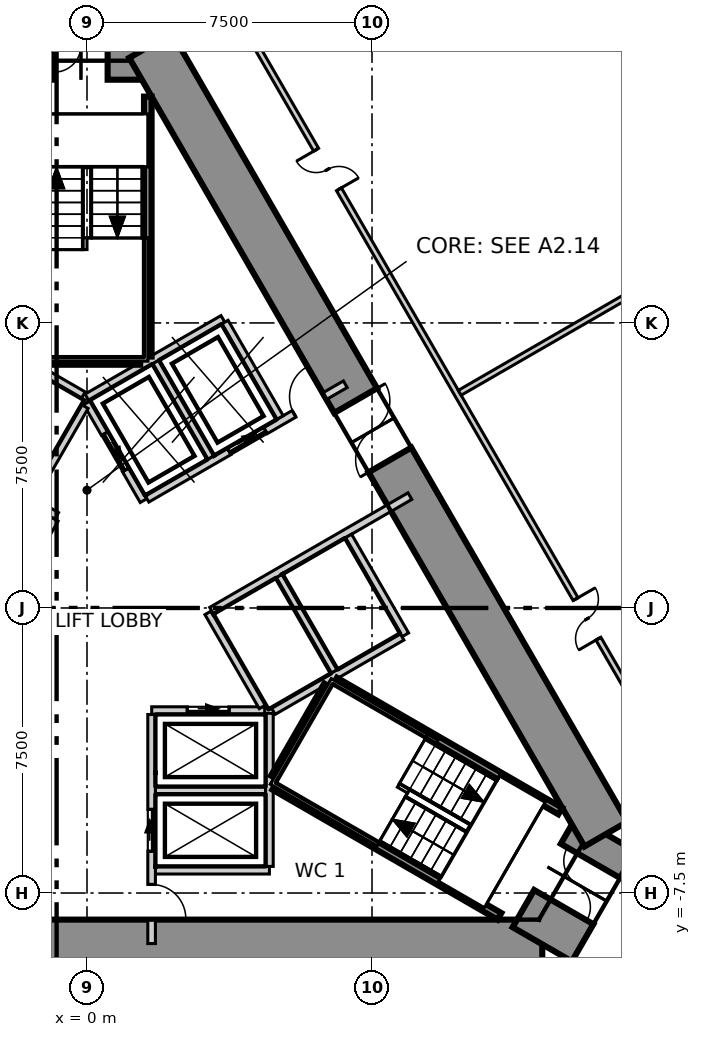
"""IFC4 building model, lengths in metres.
Left out: names, types, materials, properties, quantities, classifications, styles, units other than length and angle.
Written with IfcOpenShell. Run it as: python <this file> out.ifc"""

import sys

from ifc_helpers import new_model, si_unit, direction, frame, frame_2d, origin, place, context, subcontext, project, spatial, polyline, rectangle, outline, extrude, element, fill, save


model = new_model("IFC4")
c1 = context("Model", 3, precision=1e-05, world=origin(), true_north=direction((0.0, 1.0)))
c2 = subcontext(c1, "Body", "Model", "MODEL_VIEW")
j1 = project(units=[si_unit("LENGTHUNIT", "METRE"), si_unit("PLANEANGLEUNIT", "RADIAN")], contexts=[c1])
p1 = place(None, origin())
s1 = spatial("IfcSite", under=j1, at=p1, CompositionType="ELEMENT")
p2 = place(p1, origin())
s2 = spatial("IfcBuilding", under=s1, at=p2, CompositionType="ELEMENT")
p3 = place(p2, frame((0.0, 0.0, 99.8)))
s3 = spatial("IfcBuildingStorey", under=s2, at=p3, CompositionType="ELEMENT", Elevation=99.8)
p4 = place(p3, frame((1.674, 14.8, -0.6), z_axis=(0.0, 0.0, 1.0), x_axis=(-1.0, 0.0, 0.0)))
e1 = element("IfcWall", 1, at=p4, inside=s3, PredefinedType="SHEAR", context=c2, shape_type="SweptSolid", body=[
    extrude(outline(polyline([(-0.231, -0.9), (1.674, -0.9), (3.579, -0.9), (3.117, 0.9), (1.674, 0.9), (0.231, 0.9), (-0.231, -0.9)])), origin(), (0.0, 0.0, 1.0), 4.8),
])
p5 = place(p4, frame((1.133, 0.0, 0.6)))
e2 = element("IfcOpeningElement", 2, at=p5, cuts=e1, PredefinedType="OPENING", context=c2, shape_type="SweptSolid", body=[
    extrude(rectangle(XDim=1.4, YDim=2.1, at=frame_2d((0.7, 1.05))), frame((0.0, 0.91, 0.0), z_axis=(0.0, -1.0, 0.0), x_axis=(1.0, 0.0, 0.0)), (0.0, 0.0, 1.0), 1.82),
])
p6 = place(p3, frame((-11.98, -8.85, -0.6), z_axis=(0.0, 0.0, 1.0), x_axis=(1.0, 0.0, 0.0)))
e3 = element("IfcWall", 3, at=p6, inside=s3, PredefinedType="SHEAR", context=c2, shape_type="SweptSolid", body=[
    extrude(outline(polyline([(-0.664, -0.65), (1.281, -0.65), (3.226, -0.65), (5.172, -0.65), (7.117, -0.65), (9.062, -0.65), (11.007, -0.65), (12.953, -0.65), (14.898, -0.65), (16.843, -0.65), (18.788, -0.65), (20.734, -0.65), (22.679, -0.65), (24.624, -0.65), (23.296, 0.65), (21.41, 0.65), (19.524, 0.65), (17.638, 0.65), (15.752, 0.65), (13.866, 0.65), (11.98, 0.65), (10.094, 0.65), (8.208, 0.65), (6.322, 0.65), (4.436, 0.65), (2.55, 0.65), (0.664, 0.65), (-0.664, -0.65)])), origin(), (0.0, 0.0, 1.0), 4.8),
])
p7 = place(p3, frame((11.98, -8.85, -0.6), z_axis=(0.0, 0.0, 1.0), x_axis=(0.499926515799, 0.866067825751, 0.0)))
e4 = element("IfcWall", 4, at=p7, inside=s3, PredefinedType="SHEAR", context=c2, shape_type="SweptSolid", body=[
    extrude(outline(polyline([(-0.231, -0.9), (1.674, -0.9), (3.579, -0.9), (3.118, 0.9), (1.674, 0.9), (0.231, 0.9), (-0.231, -0.9)])), origin(), (0.0, 0.0, 1.0), 4.8),
])
p8 = place(p7, frame((1.133, 0.0, 0.6)))
e5 = element("IfcOpeningElement", 5, at=p8, cuts=e4, PredefinedType="OPENING", context=c2, shape_type="SweptSolid", body=[
    extrude(rectangle(XDim=1.4, YDim=2.1, at=frame_2d((0.7, 1.05))), frame((0.0, 0.91, 0.0), z_axis=(0.0, -1.0, 0.0), x_axis=(1.0, 0.0, 0.0)), (0.0, 0.0, 1.0), 1.82),
])
p9 = place(p3, frame((13.654, -5.95, -0.6), z_axis=(0.0, 0.0, 1.0), x_axis=(-0.499998822509, 0.866026083608, 0.0)))
e6 = element("IfcWall", 6, at=p9, inside=s3, PredefinedType="SHEAR", context=c2, shape_type="SweptSolid", body=[
    extrude(outline(polyline([(-0.664, -0.65), (1.281, -0.65), (3.226, -0.65), (5.172, -0.65), (7.117, -0.65), (9.062, -0.65), (11.007, -0.65), (12.953, -0.65), (14.898, -0.65), (16.843, -0.65), (18.788, -0.65), (20.734, -0.65), (22.679, -0.65), (24.624, -0.65), (23.296, 0.65), (21.41, 0.65), (19.524, 0.65), (17.638, 0.65), (15.752, 0.65), (13.866, 0.65), (11.98, 0.65), (10.094, 0.65), (8.208, 0.65), (6.322, 0.65), (4.436, 0.65), (2.55, 0.65), (0.664, 0.65), (-0.664, -0.65)])), origin(), (0.0, 0.0, 1.0), 4.8),
])
p10 = place(p9, frame((11.369, 0.0, 0.6)))
e7 = element("IfcOpeningElement", 7, at=p10, cuts=e6, PredefinedType="OPENING", context=c2, shape_type="SweptSolid", body=[
    extrude(rectangle(XDim=1.8, YDim=2.1, at=frame_2d((0.9, 1.05))), frame((0.0, 0.66, 0.0), z_axis=(0.0, -1.0, 0.0), x_axis=(1.0, 0.0, 0.0)), (0.0, 0.0, 1.0), 1.32),
])
p11 = place(p3, frame((32.683, -15.155, 0.0), z_axis=(0.0, 0.0, 1.0), x_axis=(-0.499995323711, 0.866028103624, 0.0)))
e8 = element("IfcWall", 8, at=p11, inside=s3, PredefinedType="ELEMENTEDWALL", context=c2, shape_type="SweptSolid", body=[
    extrude(rectangle(XDim=58.913, YDim=0.2, at=frame_2d((29.456, 0.0))), origin(), (0.0, 0.0, 1.0), 4.2),
])
p12 = place(p11, frame((2.023, 0.0, 0.6)))
e9 = element("IfcOpeningElement", 9, at=p12, cuts=e8, PredefinedType="OPENING", context=c2, shape_type="SweptSolid", body=[
    extrude(rectangle(XDim=5.6, YDim=3.0, at=frame_2d((2.8, 1.5))), frame((0.0, 0.11, 0.0), z_axis=(0.0, -1.0, 0.0), x_axis=(1.0, 0.0, 0.0)), (0.0, 0.0, 1.0), 0.22),
])
p13 = place(p11, frame((9.064, 0.0, 0.6)))
e10 = element("IfcOpeningElement", 10, at=p13, cuts=e8, PredefinedType="OPENING", context=c2, shape_type="SweptSolid", body=[
    extrude(rectangle(XDim=5.6, YDim=3.0, at=frame_2d((2.8, 1.5))), frame((0.0, 0.11, 0.0), z_axis=(0.0, -1.0, 0.0), x_axis=(1.0, 0.0, 0.0)), (0.0, 0.0, 1.0), 0.22),
])
p14 = place(p11, frame((16.105, 0.0, 0.6)))
e11 = element("IfcOpeningElement", 11, at=p14, cuts=e8, PredefinedType="OPENING", context=c2, shape_type="SweptSolid", body=[
    extrude(rectangle(XDim=5.6, YDim=3.0, at=frame_2d((2.8, 1.5))), frame((0.0, 0.11, 0.0), z_axis=(0.0, -1.0, 0.0), x_axis=(1.0, 0.0, 0.0)), (0.0, 0.0, 1.0), 0.22),
])
p15 = place(p11, frame((23.146, 0.0, 0.6)))
e12 = element("IfcOpeningElement", 12, at=p15, cuts=e8, PredefinedType="OPENING", context=c2, shape_type="SweptSolid", body=[
    extrude(rectangle(XDim=5.6, YDim=3.0, at=frame_2d((2.8, 1.5))), frame((0.0, 0.11, 0.0), z_axis=(0.0, -1.0, 0.0), x_axis=(1.0, 0.0, 0.0)), (0.0, 0.0, 1.0), 0.22),
])
p16 = place(p11, frame((30.187, 0.0, 0.6)))
e13 = element("IfcOpeningElement", 13, at=p16, cuts=e8, PredefinedType="OPENING", context=c2, shape_type="SweptSolid", body=[
    extrude(rectangle(XDim=5.6, YDim=3.0, at=frame_2d((2.8, 1.5))), frame((0.0, 0.11, 0.0), z_axis=(0.0, -1.0, 0.0), x_axis=(1.0, 0.0, 0.0)), (0.0, 0.0, 1.0), 0.22),
])
p17 = place(p11, frame((37.228, 0.0, 0.6)))
e14 = element("IfcOpeningElement", 14, at=p17, cuts=e8, PredefinedType="OPENING", context=c2, shape_type="SweptSolid", body=[
    extrude(rectangle(XDim=5.6, YDim=3.0, at=frame_2d((2.8, 1.5))), frame((0.0, 0.11, 0.0), z_axis=(0.0, -1.0, 0.0), x_axis=(1.0, 0.0, 0.0)), (0.0, 0.0, 1.0), 0.22),
])
p18 = place(p11, frame((44.268, 0.0, 0.6)))
e15 = element("IfcOpeningElement", 15, at=p18, cuts=e8, PredefinedType="OPENING", context=c2, shape_type="SweptSolid", body=[
    extrude(rectangle(XDim=5.6, YDim=3.0, at=frame_2d((2.8, 1.5))), frame((0.0, 0.11, 0.0), z_axis=(0.0, -1.0, 0.0), x_axis=(1.0, 0.0, 0.0)), (0.0, 0.0, 1.0), 0.22),
])
p19 = place(p11, frame((51.309, 0.0, 0.6)))
e16 = element("IfcOpeningElement", 16, at=p19, cuts=e8, PredefinedType="OPENING", context=c2, shape_type="SweptSolid", body=[
    extrude(rectangle(XDim=5.6, YDim=3.0, at=frame_2d((2.8, 1.5))), frame((0.0, 0.11, 0.0), z_axis=(0.0, -1.0, 0.0), x_axis=(1.0, 0.0, 0.0)), (0.0, 0.0, 1.0), 0.22),
])
p20 = place(p3, frame((2.959, 17.375, 0.0), z_axis=(0.0, 0.0, 1.0), x_axis=(0.500002192499, -0.866024137941, 0.0)))
e17 = element("IfcWall", 17, at=p20, inside=s3, PredefinedType="PARTITIONING", context=c2, shape_type="SweptSolid", body=[
    extrude(rectangle(XDim=27.222, YDim=0.15, at=frame_2d((13.611, 0.0))), origin(), (0.0, 0.0, 1.0), 4.2),
])
p21 = place(p20, frame((19.795, 0.0, 0.0)))
e18 = element("IfcOpeningElement", 18, at=p21, cuts=e17, PredefinedType="OPENING", context=c2, shape_type="SweptSolid", body=[
    extrude(rectangle(XDim=1.2, YDim=2.1, at=frame_2d((0.6, 1.05))), frame((0.0, 0.085, 0.0), z_axis=(0.0, -1.0, 0.0), x_axis=(1.0, 0.0, 0.0)), (0.0, 0.0, 1.0), 0.17),
])
p22 = place(p20, frame((6.141, 0.0, 0.0)))
e19 = element("IfcOpeningElement", 19, at=p22, cuts=e17, PredefinedType="OPENING", context=c2, shape_type="SweptSolid", body=[
    extrude(rectangle(XDim=1.2, YDim=2.1, at=frame_2d((0.6, 1.05))), frame((0.0, 0.085, 0.0), z_axis=(0.0, -1.0, 0.0), x_axis=(1.0, 0.0, 0.0)), (0.0, 0.0, 1.0), 0.17),
])
p23 = place(p3, frame((9.808, 5.662, 0.0), z_axis=(0.0, 0.0, 1.0), x_axis=(0.866014767649, 0.500018421874, 0.0)))
e20 = element("IfcWall", 20, at=p23, inside=s3, PredefinedType="PARTITIONING", context=c2, shape_type="SweptSolid", body=[
    extrude(rectangle(XDim=9.402, YDim=0.15, at=frame_2d((4.701, 0.0))), origin(), (0.0, 0.0, 1.0), 3.7),
])
p24 = place(p3, frame((1.8, -4.8, 0.0), z_axis=(0.0, 0.0, 1.0), x_axis=(1.0, 0.0, 0.0)))
e21 = element("IfcWall", 21, at=p24, inside=s3, PredefinedType="SOLIDWALL", context=c2, shape_type="SweptSolid", body=[
    extrude(rectangle(XDim=2.9, YDim=0.2, at=frame_2d((1.45, 0.0))), origin(), (0.0, 0.0, 1.0), 4.2),
])
p25 = place(p3, frame((1.8, -6.9, 0.0), z_axis=(0.0, 0.0, 1.0), x_axis=(1.0, 0.0, 0.0)))
e22 = element("IfcWall", 22, at=p25, inside=s3, PredefinedType="SOLIDWALL", context=c2, shape_type="SweptSolid", body=[
    extrude(rectangle(XDim=3.0, YDim=0.2, at=frame_2d((1.5, 0.0))), origin(), (0.0, 0.0, 1.0), 4.2),
])
p26 = place(p3, frame((1.703, -2.7, 0.0), z_axis=(0.0, 0.0, 1.0), x_axis=(1.0, 0.0, 0.0)))
e23 = element("IfcWall", 23, at=p26, inside=s3, PredefinedType="SOLIDWALL", context=c2, shape_type="SweptSolid", body=[
    extrude(rectangle(XDim=2.973, YDim=0.2, at=frame_2d((1.487, 0.0))), origin(), (0.0, 0.0, 1.0), 4.2),
])
p27 = place(p26, frame((0.936, 0.0, 0.0)))
e24 = element("IfcOpeningElement", 24, at=p27, cuts=e23, PredefinedType="OPENING", context=c2, shape_type="SweptSolid", body=[
    extrude(rectangle(XDim=1.1, YDim=2.1, at=frame_2d((0.55, 1.05))), frame((0.0, 0.11, 0.0), z_axis=(0.0, -1.0, 0.0), x_axis=(1.0, 0.0, 0.0)), (0.0, 0.0, 1.0), 0.22),
])
p28 = place(p3, frame((-0.002, 5.541, 0.0), z_axis=(0.0, 0.0, 1.0), x_axis=(0.86600155993, 0.500041296494, 0.0)))
e25 = element("IfcWall", 25, at=p28, inside=s3, PredefinedType="SOLIDWALL", context=c2, shape_type="SweptSolid", body=[
    extrude(rectangle(XDim=4.132, YDim=0.2, at=frame_2d((2.066, 0.0))), origin(), (0.0, 0.0, 1.0), 4.2),
])
p29 = place(p3, frame((0.0, 5.4, 0.0), z_axis=(0.0, 0.0, 1.0), x_axis=(0.500103862429, -0.865965430478, 0.0)))
e26 = element("IfcWall", 26, at=p29, inside=s3, PredefinedType="SOLIDWALL", context=c2, shape_type="SweptSolid", body=[
    extrude(rectangle(XDim=2.973, YDim=0.2, at=frame_2d((1.487, 0.0))), origin(), (0.0, 0.0, 1.0), 4.2),
])
p30 = place(p29, frame((0.937, 0.0, 0.0)))
e27 = element("IfcOpeningElement", 27, at=p30, cuts=e26, PredefinedType="OPENING", context=c2, shape_type="SweptSolid", body=[
    extrude(rectangle(XDim=1.1, YDim=2.1, at=frame_2d((0.55, 1.05))), frame((0.0, 0.11, 0.0), z_axis=(0.0, -1.0, 0.0), x_axis=(1.0, 0.0, 0.0)), (0.0, 0.0, 1.0), 0.22),
])
p31 = place(p3, frame((3.19, -0.125, 0.0), z_axis=(0.0, 0.0, 1.0), x_axis=(0.499988658015, -0.866031951983, 0.0)))
e28 = element("IfcWall", 28, at=p31, inside=s3, PredefinedType="SOLIDWALL", context=c2, shape_type="SweptSolid", body=[
    extrude(rectangle(XDim=2.858, YDim=0.2, at=frame_2d((1.429, 0.0))), origin(), (0.0, 0.0, 1.0), 4.2),
])
p32 = place(p3, frame((1.578, 2.874, 0.0), z_axis=(0.0, 0.0, 1.0), x_axis=(0.866053365281, 0.49995156614, 0.0)))
e29 = element("IfcWall", 29, at=p32, inside=s3, PredefinedType="SOLIDWALL", context=c2, shape_type="SweptSolid", body=[
    extrude(rectangle(XDim=6.026, YDim=0.2, at=frame_2d((3.013, 0.0))), origin(), (0.0, 0.0, 1.0), 4.2),
])
p33 = place(p32, frame((2.496, 0.0, 0.0)))
e30 = element("IfcOpeningElement", 30, at=p33, cuts=e29, PredefinedType="OPENING", context=c2, shape_type="SweptSolid", body=[
    extrude(rectangle(XDim=1.1, YDim=2.1, at=frame_2d((0.55, 1.05))), frame((0.0, 0.11, 0.0), z_axis=(0.0, -1.0, 0.0), x_axis=(1.0, 0.0, 0.0)), (0.0, 0.0, 1.0), 0.22),
])
p34 = place(p32, frame((4.471, 0.0, 0.0)))
e31 = element("IfcOpeningElement", 31, at=p34, cuts=e29, PredefinedType="OPENING", context=c2, shape_type="SweptSolid", body=[
    extrude(rectangle(XDim=0.9, YDim=2.1, at=frame_2d((0.45, 1.05))), frame((0.0, 0.11, 0.0), z_axis=(0.0, -1.0, 0.0), x_axis=(1.0, 0.0, 0.0)), (0.0, 0.0, 1.0), 0.22),
])
p35 = place(p3, frame((1.7, -8.83, 0.0), z_axis=(0.0, 0.0, 1.0), x_axis=(0.0, 1.0, 0.0)))
e32 = element("IfcWall", 32, at=p35, inside=s3, PredefinedType="SOLIDWALL", context=c2, shape_type="SweptSolid", body=[
    extrude(rectangle(XDim=6.027, YDim=0.2, at=frame_2d((3.014, 0.0))), origin(), (0.0, 0.0, 1.0), 4.2),
])
p36 = place(p35, frame((2.43, 0.0, 0.0)))
e33 = element("IfcOpeningElement", 33, at=p36, cuts=e32, PredefinedType="OPENING", context=c2, shape_type="SweptSolid", body=[
    extrude(rectangle(XDim=1.1, YDim=2.1, at=frame_2d((0.55, 1.05))), frame((0.0, 0.11, 0.0), z_axis=(0.0, -1.0, 0.0), x_axis=(1.0, 0.0, 0.0)), (0.0, 0.0, 1.0), 0.22),
])
p37 = place(p35, frame((0.655, 0.0, 0.0)))
e34 = element("IfcOpeningElement", 34, at=p37, cuts=e32, PredefinedType="OPENING", context=c2, shape_type="SweptSolid", body=[
    extrude(rectangle(XDim=0.9, YDim=2.1, at=frame_2d((0.45, 1.05))), frame((0.0, 0.11, 0.0), z_axis=(0.0, -1.0, 0.0), x_axis=(1.0, 0.0, 0.0)), (0.0, 0.0, 1.0), 0.22),
])
p38 = place(p3, frame((4.8, -6.8, 0.0), z_axis=(0.0, 0.0, 1.0), x_axis=(0.0, 1.0, 0.0)))
e35 = element("IfcWall", 35, at=p38, inside=s3, PredefinedType="SOLIDWALL", context=c2, shape_type="SweptSolid", body=[
    extrude(rectangle(XDim=4.029, YDim=0.2, at=frame_2d((2.015, 0.0))), origin(), (0.0, 0.0, 1.0), 4.2),
])
p39 = place(p3, frame((3.278, -0.071, 0.0), z_axis=(0.0, 0.0, 1.0), x_axis=(0.865955525127, 0.500121013857, 0.0)))
e36 = element("IfcWall", 36, at=p39, inside=s3, PredefinedType="SOLIDWALL", context=c2, shape_type="SweptSolid", body=[
    extrude(rectangle(XDim=6.027, YDim=0.2, at=frame_2d((3.013, 0.0))), origin(), (0.0, 0.0, 1.0), 4.2),
])
p40 = place(p3, frame((3.626, 7.52, 0.0), z_axis=(0.0, 0.0, 1.0), x_axis=(0.500060147554, -0.865990674793, 0.0)))
e37 = element("IfcWall", 37, at=p40, inside=s3, PredefinedType="SOLIDWALL", context=c2, shape_type="SweptSolid", body=[
    extrude(rectangle(XDim=2.9, YDim=0.2, at=frame_2d((1.45, 0.0))), origin(), (0.0, 0.0, 1.0), 4.2),
])
p41 = place(p3, frame((6.876, 1.891, 0.0), z_axis=(0.0, 0.0, 1.0), x_axis=(0.499990139034, -0.866031096941, 0.0)))
e38 = element("IfcWall", 38, at=p41, inside=s3, PredefinedType="SOLIDWALL", context=c2, shape_type="SweptSolid", body=[
    extrude(rectangle(XDim=3.0, YDim=0.2, at=frame_2d((1.5, 0.0))), origin(), (0.0, 0.0, 1.0), 4.2),
])
for number, where, z_axis, x_axis in (
    (39, (1.807, 6.47, 0.0), (0.0, 0.0, 1.0), (0.5, -0.866, 0.0)),
    (40, (5.057, 0.841, 0.0), (0.0, 0.0, 1.0), (0.5, -0.866, 0.0)),
):
    element("IfcWall", number, at=place(p3, frame(where, z_axis=z_axis, x_axis=x_axis)), inside=s3, PredefinedType="SOLIDWALL", context=c2, shape_type="SweptSolid", body=[
        extrude(rectangle(XDim=2.9, YDim=0.2, at=frame_2d((1.45, 0.0))), origin(), (0.0, 0.0, 1.0), 4.2),
    ])
p42 = place(p3, frame((4.9, -2.714, 0.0), z_axis=(0.0, 0.0, 1.0), x_axis=(0.865992350556, 0.500057245502, 0.0)))
e41 = element("IfcWall", 41, at=p42, inside=s3, PredefinedType="SOLIDWALL", context=c2, shape_type="SweptSolid", body=[
    extrude(rectangle(XDim=3.914, YDim=0.2, at=frame_2d((1.957, 0.0))), origin(), (0.0, 0.0, 1.0), 4.2),
])
p43 = place(p3, frame((-1.488, 2.822, 0.0), z_axis=(0.0, 0.0, 1.0), x_axis=(0.866236612152, -0.499633997809, 0.0)))
e42 = element("IfcWall", 42, at=p43, inside=s3, PredefinedType="SOLIDWALL", context=c2, shape_type="SweptSolid", body=[
    extrude(rectangle(XDim=0.796, YDim=0.2, at=frame_2d((0.398, 0.0))), origin(), (0.0, 0.0, 1.0), 4.2),
])
p44 = place(p3, frame((-2.444, -0.433, 0.0), z_axis=(0.0, 0.0, 1.0), x_axis=(0.500035624827, 0.866004834804, 0.0)))
e43 = element("IfcWall", 43, at=p44, inside=s3, PredefinedType="SOLIDWALL", context=c2, shape_type="SweptSolid", body=[
    extrude(rectangle(XDim=3.194, YDim=0.2, at=frame_2d((1.597, 0.0))), origin(), (0.0, 0.0, 1.0), 4.2),
])
p45 = place(p3, frame((-1.67, 6.507, 0.0), z_axis=(0.0, 0.0, 1.0), x_axis=(0.865941441609, -0.500145398563, 0.0)))
e44 = element("IfcWall", 44, at=p45, inside=s3, PredefinedType="SOLIDWALL", context=c2, shape_type="SweptSolid", body=[
    extrude(rectangle(XDim=1.815, YDim=0.2, at=frame_2d((0.908, 0.0))), origin(), (0.0, 0.0, 1.0), 4.2),
])
p46 = place(p3, frame((-1.438, 2.909, 0.0), z_axis=(0.0, 0.0, 1.0), x_axis=(0.499829630636, 0.866123744241, 0.0)))
e45 = element("IfcWall", 45, at=p46, inside=s3, PredefinedType="SOLIDWALL", context=c2, shape_type="SweptSolid", body=[
    extrude(rectangle(XDim=2.761, YDim=0.2, at=frame_2d((1.38, 0.0))), origin(), (0.0, 0.0, 1.0), 4.2),
])
p47 = place(p3, frame((1.6, 6.615, 0.0), z_axis=(0.0, 0.0, 1.0), x_axis=(0.0, 1.0, 0.0)))
e46 = element("IfcWall", 46, at=p47, inside=s3, PredefinedType="SOLIDWALL", context=c2, shape_type="SweptSolid", body=[
    extrude(rectangle(XDim=6.84, YDim=0.2, at=frame_2d((3.42, 0.0))), origin(), (0.0, 0.0, 1.0), 4.2),
])
p48 = place(p3, frame((-1.4, 6.5, 0.0), z_axis=(0.0, 0.0, 1.0), x_axis=(1.0, 0.0, 0.0)))
e47 = element("IfcWall", 47, at=p48, inside=s3, PredefinedType="SOLIDWALL", context=c2, shape_type="SweptSolid", body=[
    extrude(rectangle(XDim=2.8, YDim=0.2, at=frame_2d((1.4, 0.0))), origin(), (0.0, 0.0, 1.0), 4.2),
])
p49 = place(p3, frame((4.929, -4.693, 0.0), z_axis=(0.0, 0.0, 1.0), x_axis=(0.866047105788, -0.499962409144, 0.0)))
e48 = element("IfcWall", 48, at=p49, inside=s3, PredefinedType="SOLIDWALL", context=c2, shape_type="SweptSolid", body=[
    extrude(rectangle(XDim=6.84, YDim=0.2, at=frame_2d((3.42, 0.0))), origin(), (0.0, 0.0, 1.0), 4.2),
])
p50 = place(p3, frame((4.929, -4.462, 0.0), z_axis=(0.0, 0.0, 1.0), x_axis=(0.500200581029, 0.865909567298, 0.0)))
e49 = element("IfcWall", 49, at=p50, inside=s3, PredefinedType="SOLIDWALL", context=c2, shape_type="SweptSolid", body=[
    extrude(rectangle(XDim=2.799, YDim=0.2, at=frame_2d((1.399, 0.0))), origin(), (0.0, 0.0, 1.0), 4.2),
])
p51 = place(p3, frame((6.529, -1.922, 0.0), z_axis=(0.0, 0.0, 1.0), x_axis=(0.866002488145, -0.500039688951, 0.0)))
e50 = element("IfcWall", 50, at=p51, inside=s3, PredefinedType="SOLIDWALL", context=c2, shape_type="SweptSolid", body=[
    extrude(rectangle(XDim=6.839, YDim=0.2, at=frame_2d((3.42, 0.0))), origin(), (0.0, 0.0, 1.0), 4.2),
])
p52 = place(p27, origin())
e51 = element("IfcDoor", 51, at=p52, inside=s3, OperationType="SLIDING_TO_LEFT", PredefinedType="DOOR", context=c2, shape_type="SweptSolid", body=[
    extrude(rectangle(XDim=1.1, YDim=2.1, at=frame_2d((0.55, 1.05))), frame((0.0, 0.025, 0.0), z_axis=(0.0, -1.0, 0.0), x_axis=(1.0, 0.0, 0.0)), (0.0, 0.0, 1.0), 0.05),
])
fill(e24, e51)
p53 = place(p36, origin())
e52 = element("IfcDoor", 52, at=p53, inside=s3, OperationType="SLIDING_TO_LEFT", PredefinedType="DOOR", context=c2, shape_type="SweptSolid", body=[
    extrude(rectangle(XDim=1.1, YDim=2.1, at=frame_2d((0.55, 1.05))), frame((0.0, 0.025, 0.0), z_axis=(0.0, -1.0, 0.0), x_axis=(1.0, 0.0, 0.0)), (0.0, 0.0, 1.0), 0.05),
])
fill(e33, e52)
p54 = place(p30, origin())
e53 = element("IfcDoor", 53, at=p54, inside=s3, OperationType="SLIDING_TO_LEFT", PredefinedType="DOOR", context=c2, shape_type="SweptSolid", body=[
    extrude(rectangle(XDim=1.1, YDim=2.1, at=frame_2d((0.55, 1.05))), frame((0.0, 0.025, 0.0), z_axis=(0.0, -1.0, 0.0), x_axis=(1.0, 0.0, 0.0)), (0.0, 0.0, 1.0), 0.05),
])
fill(e27, e53)
p55 = place(p33, origin())
e54 = element("IfcDoor", 54, at=p55, inside=s3, OperationType="SLIDING_TO_LEFT", PredefinedType="DOOR", context=c2, shape_type="SweptSolid", body=[
    extrude(rectangle(XDim=1.1, YDim=2.1, at=frame_2d((0.55, 1.05))), frame((0.0, 0.025, 0.0), z_axis=(0.0, -1.0, 0.0), x_axis=(1.0, 0.0, 0.0)), (0.0, 0.0, 1.0), 0.05),
])
fill(e30, e54)
p56 = place(p21, origin())
e55 = element("IfcDoor", 55, at=p56, inside=s3, OperationType="DOUBLE_DOOR_SINGLE_SWING", PredefinedType="DOOR", context=c2, shape_type="SweptSolid", body=[
    extrude(rectangle(XDim=1.2, YDim=2.1, at=frame_2d((0.6, 1.05))), frame((0.0, 0.025, 0.0), z_axis=(0.0, -1.0, 0.0), x_axis=(1.0, 0.0, 0.0)), (0.0, 0.0, 1.0), 0.05),
])
fill(e18, e55)
p57 = place(p22, origin())
e56 = element("IfcDoor", 56, at=p57, inside=s3, OperationType="DOUBLE_DOOR_SINGLE_SWING", PredefinedType="DOOR", context=c2, shape_type="SweptSolid", body=[
    extrude(rectangle(XDim=1.2, YDim=2.1, at=frame_2d((0.6, 1.05))), frame((0.0, 0.025, 0.0), z_axis=(0.0, -1.0, 0.0), x_axis=(1.0, 0.0, 0.0)), (0.0, 0.0, 1.0), 0.05),
])
fill(e19, e56)
p58 = place(p10, origin())
e57 = element("IfcDoor", 57, at=p58, inside=s3, OperationType="DOUBLE_DOOR_SINGLE_SWING", PredefinedType="DOOR", context=c2, shape_type="SweptSolid", body=[
    extrude(rectangle(XDim=1.8, YDim=2.1, at=frame_2d((0.9, 1.05))), frame((0.0, 0.025, 0.0), z_axis=(0.0, -1.0, 0.0), x_axis=(1.0, 0.0, 0.0)), (0.0, 0.0, 1.0), 0.05),
])
fill(e7, e57)
p59 = place(p8, origin())
e58 = element("IfcDoor", 58, at=p59, inside=s3, OperationType="DOUBLE_DOOR_SINGLE_SWING", PredefinedType="DOOR", context=c2, shape_type="SweptSolid", body=[
    extrude(rectangle(XDim=1.4, YDim=2.1, at=frame_2d((0.7, 1.05))), frame((0.0, 0.025, 0.0), z_axis=(0.0, -1.0, 0.0), x_axis=(1.0, 0.0, 0.0)), (0.0, 0.0, 1.0), 0.05),
])
fill(e5, e58)
p60 = place(p37, origin())
e59 = element("IfcDoor", 59, at=p60, inside=s3, OperationType="SINGLE_SWING_LEFT", PredefinedType="DOOR", context=c2, shape_type="SweptSolid", body=[
    extrude(rectangle(XDim=0.9, YDim=2.1, at=frame_2d((0.45, 1.05))), frame((0.0, 0.025, 0.0), z_axis=(0.0, -1.0, 0.0), x_axis=(1.0, 0.0, 0.0)), (0.0, 0.0, 1.0), 0.05),
])
fill(e34, e59)
p61 = place(p34, origin())
e60 = element("IfcDoor", 60, at=p61, inside=s3, OperationType="SINGLE_SWING_LEFT", PredefinedType="DOOR", context=c2, shape_type="SweptSolid", body=[
    extrude(rectangle(XDim=0.9, YDim=2.1, at=frame_2d((0.45, 1.05))), frame((0.0, 0.025, 0.0), z_axis=(0.0, -1.0, 0.0), x_axis=(1.0, 0.0, 0.0)), (0.0, 0.0, 1.0), 0.05),
])
fill(e31, e60)
save(model, sys.argv[1])
